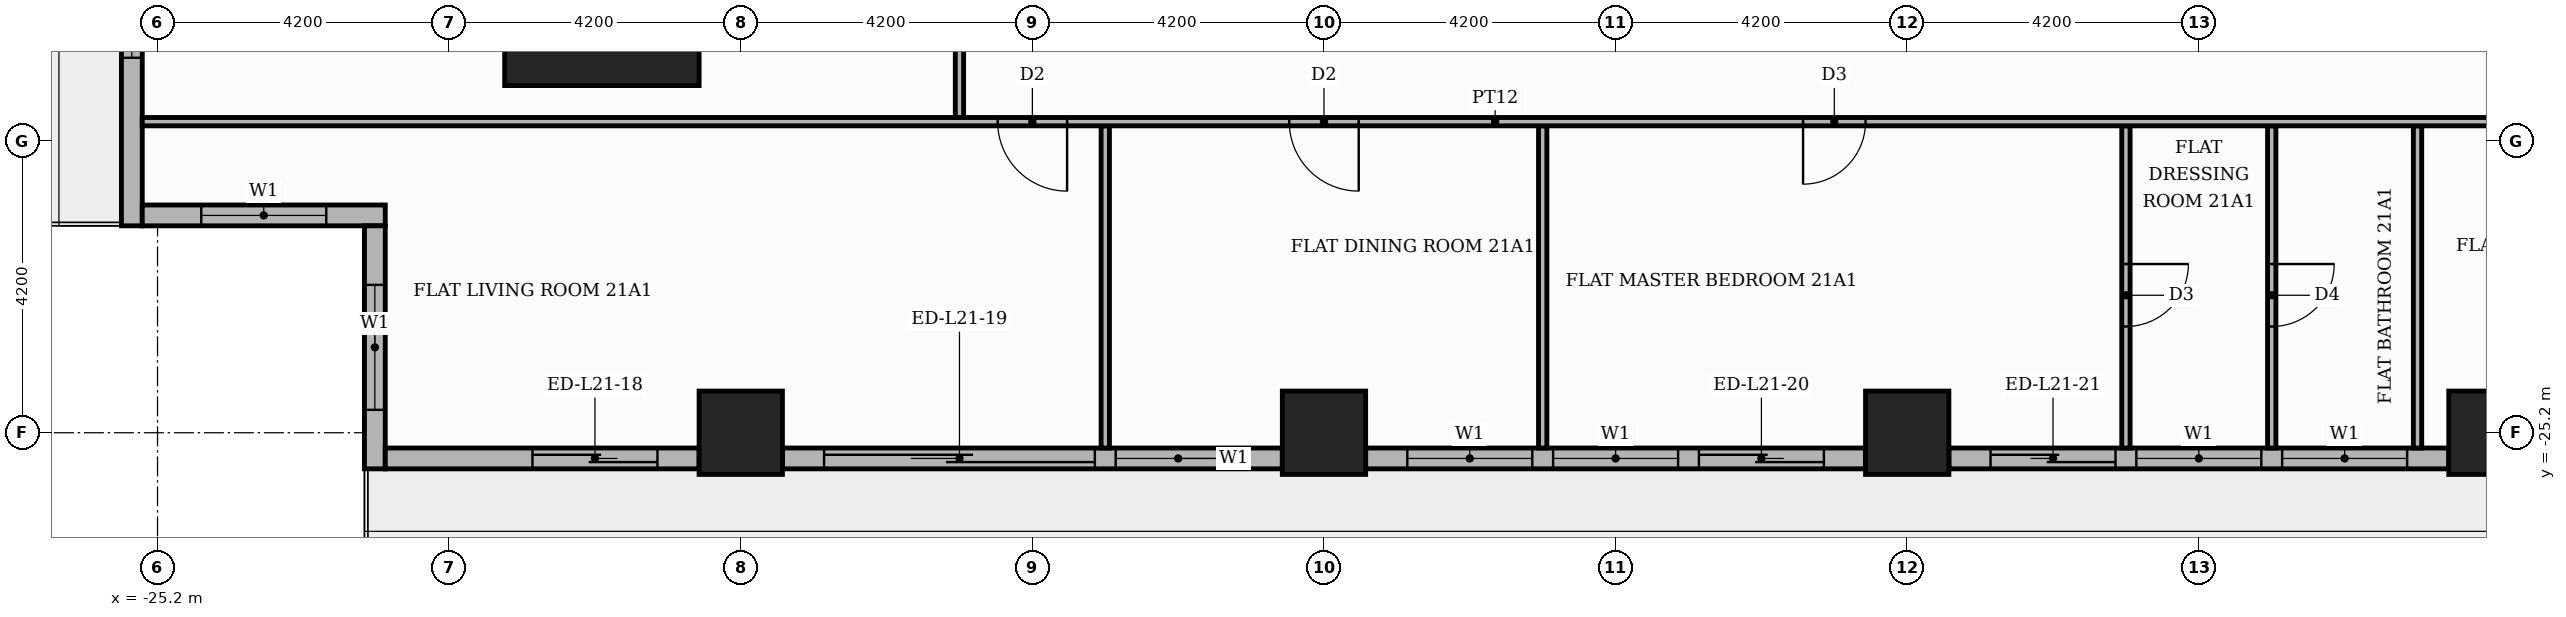
"""IFC4 building model, lengths in metres.
Left out: names, types, materials, properties, quantities, classifications, styles, units other than length and angle.
Written with IfcOpenShell. Run it as: python <this file> out.ifc"""

import sys

from ifc_helpers import new_model, si_unit, direction, frame, frame_2d, origin, origin_2d, place, context, subcontext, project, spatial, rectangle, extrude, element, fill, save


model = new_model("IFC4")
c1 = context("Model", 3, precision=1e-05, world=origin(), true_north=direction((0.0, 1.0)))
c2 = subcontext(c1, "Body", "Model", "MODEL_VIEW")
j1 = project(units=[si_unit("LENGTHUNIT", "METRE"), si_unit("PLANEANGLEUNIT", "RADIAN")], contexts=[c1])
p1 = place(None, origin())
s1 = spatial("IfcSite", under=j1, at=p1, CompositionType="ELEMENT")
p2 = place(p1, origin())
s2 = spatial("IfcBuilding", under=s1, at=p2, CompositionType="ELEMENT")
p3 = place(p2, frame((0.0, 0.0, 90.9)))
s3 = spatial("IfcBuildingStorey", under=s2, at=p3, CompositionType="ELEMENT", Elevation=90.9)
p4 = place(p3, frame((-18.8, -18.8, 0.0), z_axis=(0.0, 0.0, 1.0), x_axis=(1.0, 0.0, 0.0)))
e1 = element("IfcColumn", 1, at=p4, inside=s3, PredefinedType="COLUMN", context=c2, shape_type="SweptSolid", body=[
    extrude(rectangle(XDim=2.8, YDim=2.8, at=origin_2d()), origin(), (0.0, 0.0, 1.0), 3.9),
])
for number, where, z_axis, x_axis in (
    (2, (0.0, -25.2, 0.0), (0.0, 0.0, 1.0), (1.0, 0.0, 0.0)),
    (3, (8.4, -25.2, 0.0), (0.0, 0.0, 1.0), (1.0, 0.0, 0.0)),
    (4, (-8.4, -25.2, 0.0), (0.0, 0.0, 1.0), (1.0, 0.0, 0.0)),
    (5, (-16.8, -25.2, 0.0), (0.0, 0.0, 1.0), (1.0, 0.0, 0.0)),
):
    element("IfcColumn", number, at=place(p3, frame(where, z_axis=z_axis, x_axis=x_axis)), inside=s3, PredefinedType="COLUMN", context=c2, shape_type="SweptSolid", body=[
        extrude(rectangle(XDim=1.2, YDim=1.2, at=origin_2d()), origin(), (0.0, 0.0, 1.0), 3.9),
    ])
p5 = place(p3, frame((-25.57, -17.4, 0.0), z_axis=(0.0, 0.0, 1.0), x_axis=(0.0, -1.0, 0.0)))
e6 = element("IfcWall", 6, at=p5, inside=s3, PredefinedType="STANDARD", context=c2, shape_type="SweptSolid", body=[
    extrude(rectangle(XDim=4.82, YDim=0.3, at=frame_2d((2.41, 0.0))), origin(), (0.0, 0.0, 1.0), 3.48),
])
p6 = place(p5, frame((0.6, 0.0, 0.9)))
e7 = element("IfcOpeningElement", 7, at=p6, cuts=e6, PredefinedType="OPENING", context=c2, shape_type="SweptSolid", body=[
    extrude(rectangle(XDim=1.8, YDim=2.1, at=frame_2d((0.9, 1.05))), frame((0.0, 0.16, 0.0), z_axis=(0.0, -1.0, 0.0), x_axis=(1.0, 0.0, 0.0)), (0.0, 0.0, 1.0), 0.32),
])
p7 = place(p3, frame((-25.42, -22.07, 0.0), z_axis=(0.0, 0.0, 1.0), x_axis=(1.0, 0.0, 0.0)))
e8 = element("IfcWall", 8, at=p7, inside=s3, PredefinedType="STANDARD", context=c2, shape_type="SweptSolid", body=[
    extrude(rectangle(XDim=3.5, YDim=0.3, at=frame_2d((1.75, 0.0))), origin(), (0.0, 0.0, 1.0), 3.48),
])
p8 = place(p7, frame((0.85, 0.0, 0.9)))
e9 = element("IfcOpeningElement", 9, at=p8, cuts=e8, PredefinedType="OPENING", context=c2, shape_type="SweptSolid", body=[
    extrude(rectangle(XDim=1.8, YDim=2.1, at=frame_2d((0.9, 1.05))), frame((0.0, 0.16, 0.0), z_axis=(0.0, -1.0, 0.0), x_axis=(1.0, 0.0, 0.0)), (0.0, 0.0, 1.0), 0.32),
])
p9 = place(p3, frame((-22.07, -22.22, 0.0), z_axis=(0.0, 0.0, 1.0), x_axis=(0.0, -1.0, 0.0)))
e10 = element("IfcWall", 10, at=p9, inside=s3, PredefinedType="STANDARD", context=c2, shape_type="SweptSolid", body=[
    extrude(rectangle(XDim=3.5, YDim=0.3, at=frame_2d((1.75, 0.0))), origin(), (0.0, 0.0, 1.0), 3.48),
])
p10 = place(p9, frame((0.85, 0.0, 0.9)))
e11 = element("IfcOpeningElement", 11, at=p10, cuts=e10, PredefinedType="OPENING", context=c2, shape_type="SweptSolid", body=[
    extrude(rectangle(XDim=1.8, YDim=2.1, at=frame_2d((0.9, 1.05))), frame((0.0, 0.16, 0.0), z_axis=(0.0, -1.0, 0.0), x_axis=(1.0, 0.0, 0.0)), (0.0, 0.0, 1.0), 0.32),
])
p11 = place(p3, frame((-21.92, -25.57, 0.0), z_axis=(0.0, 0.0, 1.0), x_axis=(1.0, 0.0, 0.0)))
e12 = element("IfcWall", 12, at=p11, inside=s3, PredefinedType="STANDARD", context=c2, shape_type="SweptSolid", body=[
    extrude(rectangle(XDim=4.52, YDim=0.3, at=frame_2d((2.26, 0.0))), origin(), (0.0, 0.0, 1.0), 3.48),
])
p12 = place(p11, frame((2.12, 0.0, 0.0)))
e13 = element("IfcOpeningElement", 13, at=p12, cuts=e12, PredefinedType="OPENING", context=c2, shape_type="SweptSolid", body=[
    extrude(rectangle(XDim=1.8, YDim=2.4, at=frame_2d((0.9, 1.2))), frame((0.0, 0.16, 0.0), z_axis=(0.0, -1.0, 0.0), x_axis=(1.0, 0.0, 0.0)), (0.0, 0.0, 1.0), 0.32),
])
p13 = place(p3, frame((-16.2, -25.57, 0.0), z_axis=(0.0, 0.0, 1.0), x_axis=(1.0, 0.0, 0.0)))
e14 = element("IfcWall", 14, at=p13, inside=s3, PredefinedType="STANDARD", context=c2, shape_type="SweptSolid", body=[
    extrude(rectangle(XDim=7.2, YDim=0.3, at=frame_2d((3.6, 0.0))), origin(), (0.0, 0.0, 1.0), 3.48),
])
p14 = place(p13, frame((0.6, 0.0, 0.0)))
e15 = element("IfcOpeningElement", 15, at=p14, cuts=e14, PredefinedType="OPENING", context=c2, shape_type="SweptSolid", body=[
    extrude(rectangle(XDim=3.9, YDim=2.4, at=frame_2d((1.95, 1.2))), frame((0.0, 0.16, 0.0), z_axis=(0.0, -1.0, 0.0), x_axis=(1.0, 0.0, 0.0)), (0.0, 0.0, 1.0), 0.32),
])
p15 = place(p13, frame((4.8, 0.0, 0.9)))
e16 = element("IfcOpeningElement", 16, at=p15, cuts=e14, PredefinedType="OPENING", context=c2, shape_type="SweptSolid", body=[
    extrude(rectangle(XDim=1.8, YDim=2.1, at=frame_2d((0.9, 1.05))), frame((0.0, 0.16, 0.0), z_axis=(0.0, -1.0, 0.0), x_axis=(1.0, 0.0, 0.0)), (0.0, 0.0, 1.0), 0.32),
])
p16 = place(p3, frame((-7.8, -25.57, 0.0), z_axis=(0.0, 0.0, 1.0), x_axis=(1.0, 0.0, 0.0)))
e17 = element("IfcWall", 17, at=p16, inside=s3, PredefinedType="STANDARD", context=c2, shape_type="SweptSolid", body=[
    extrude(rectangle(XDim=7.2, YDim=0.3, at=frame_2d((3.6, 0.0))), origin(), (0.0, 0.0, 1.0), 3.48),
])
p17 = place(p16, frame((0.6, 0.0, 0.9)))
e18 = element("IfcOpeningElement", 18, at=p17, cuts=e17, PredefinedType="OPENING", context=c2, shape_type="SweptSolid", body=[
    extrude(rectangle(XDim=1.8, YDim=2.1, at=frame_2d((0.9, 1.05))), frame((0.0, 0.16, 0.0), z_axis=(0.0, -1.0, 0.0), x_axis=(1.0, 0.0, 0.0)), (0.0, 0.0, 1.0), 0.32),
])
p18 = place(p16, frame((2.7, 0.0, 0.9)))
e19 = element("IfcOpeningElement", 19, at=p18, cuts=e17, PredefinedType="OPENING", context=c2, shape_type="SweptSolid", body=[
    extrude(rectangle(XDim=1.8, YDim=2.1, at=frame_2d((0.9, 1.05))), frame((0.0, 0.16, 0.0), z_axis=(0.0, -1.0, 0.0), x_axis=(1.0, 0.0, 0.0)), (0.0, 0.0, 1.0), 0.32),
])
p19 = place(p16, frame((4.8, 0.0, 0.0)))
e20 = element("IfcOpeningElement", 20, at=p19, cuts=e17, PredefinedType="OPENING", context=c2, shape_type="SweptSolid", body=[
    extrude(rectangle(XDim=1.8, YDim=2.4, at=frame_2d((0.9, 1.2))), frame((0.0, 0.16, 0.0), z_axis=(0.0, -1.0, 0.0), x_axis=(1.0, 0.0, 0.0)), (0.0, 0.0, 1.0), 0.32),
])
p20 = place(p3, frame((0.6, -25.57, 0.0), z_axis=(0.0, 0.0, 1.0), x_axis=(1.0, 0.0, 0.0)))
e21 = element("IfcWall", 21, at=p20, inside=s3, PredefinedType="STANDARD", context=c2, shape_type="SweptSolid", body=[
    extrude(rectangle(XDim=7.2, YDim=0.3, at=frame_2d((3.6, 0.0))), origin(), (0.0, 0.0, 1.0), 3.48),
])
p21 = place(p20, frame((0.6, 0.0, 0.0)))
e22 = element("IfcOpeningElement", 22, at=p21, cuts=e21, PredefinedType="OPENING", context=c2, shape_type="SweptSolid", body=[
    extrude(rectangle(XDim=1.8, YDim=2.4, at=frame_2d((0.9, 1.2))), frame((0.0, 0.16, 0.0), z_axis=(0.0, -1.0, 0.0), x_axis=(1.0, 0.0, 0.0)), (0.0, 0.0, 1.0), 0.32),
])
p22 = place(p20, frame((2.7, 0.0, 0.9)))
e23 = element("IfcOpeningElement", 23, at=p22, cuts=e21, PredefinedType="OPENING", context=c2, shape_type="SweptSolid", body=[
    extrude(rectangle(XDim=1.8, YDim=2.1, at=frame_2d((0.9, 1.05))), frame((0.0, 0.16, 0.0), z_axis=(0.0, -1.0, 0.0), x_axis=(1.0, 0.0, 0.0)), (0.0, 0.0, 1.0), 0.32),
])
p23 = place(p20, frame((4.8, 0.0, 0.9)))
e24 = element("IfcOpeningElement", 24, at=p23, cuts=e21, PredefinedType="OPENING", context=c2, shape_type="SweptSolid", body=[
    extrude(rectangle(XDim=1.8, YDim=2.1, at=frame_2d((0.9, 1.05))), frame((0.0, 0.16, 0.0), z_axis=(0.0, -1.0, 0.0), x_axis=(1.0, 0.0, 0.0)), (0.0, 0.0, 1.0), 0.32),
])
for number, where, z_axis, x_axis in (
    (25, (-11.55, -25.42, 0.0), (0.0, 0.0, 1.0), (0.0, 1.0, 0.0)),
    (26, (-5.25, -25.42, 0.0), (0.0, 0.0, 1.0), (0.0, 1.0, 0.0)),
):
    element("IfcWall", number, at=place(p3, frame(where, z_axis=z_axis, x_axis=x_axis)), inside=s3, PredefinedType="PARTITIONING", context=c2, shape_type="SweptSolid", body=[
        extrude(rectangle(XDim=4.64, YDim=0.12, at=frame_2d((2.32, 0.0))), origin(), (0.0, 0.0, 1.0), 3.48),
    ])
p24 = place(p3, frame((3.15, -25.42, 0.0), z_axis=(0.0, 0.0, 1.0), x_axis=(0.0, 1.0, 0.0)))
e27 = element("IfcWall", 27, at=p24, inside=s3, PredefinedType="PARTITIONING", context=c2, shape_type="SweptSolid", body=[
    extrude(rectangle(XDim=4.64, YDim=0.12, at=frame_2d((2.32, 0.0))), origin(), (0.0, 0.0, 1.0), 3.48),
])
p25 = place(p24, frame((1.75, 0.0, 0.0)))
e28 = element("IfcOpeningElement", 28, at=p25, cuts=e27, PredefinedType="OPENING", context=c2, shape_type="SweptSolid", body=[
    extrude(rectangle(XDim=0.9, YDim=2.1, at=frame_2d((0.45, 1.05))), frame((0.0, 0.07, 0.0), z_axis=(0.0, -1.0, 0.0), x_axis=(1.0, 0.0, 0.0)), (0.0, 0.0, 1.0), 0.14),
])
p26 = place(p3, frame((5.25, -25.42, 0.0), z_axis=(0.0, 0.0, 1.0), x_axis=(0.0, 1.0, 0.0)))
e29 = element("IfcWall", 29, at=p26, inside=s3, PredefinedType="PARTITIONING", context=c2, shape_type="SweptSolid", body=[
    extrude(rectangle(XDim=4.64, YDim=0.12, at=frame_2d((2.32, 0.0))), origin(), (0.0, 0.0, 1.0), 3.48),
])
p27 = place(p26, frame((1.75, 0.0, 0.0)))
e30 = element("IfcOpeningElement", 30, at=p27, cuts=e29, PredefinedType="OPENING", context=c2, shape_type="SweptSolid", body=[
    extrude(rectangle(XDim=0.9, YDim=2.1, at=frame_2d((0.45, 1.05))), frame((0.0, 0.07, 0.0), z_axis=(0.0, -1.0, 0.0), x_axis=(1.0, 0.0, 0.0)), (0.0, 0.0, 1.0), 0.14),
])
p28 = place(p3, frame((7.35, -25.42, 0.0), z_axis=(0.0, 0.0, 1.0), x_axis=(0.0, 1.0, 0.0)))
e31 = element("IfcWall", 31, at=p28, inside=s3, PredefinedType="PARTITIONING", context=c2, shape_type="SweptSolid", body=[
    extrude(rectangle(XDim=4.64, YDim=0.12, at=frame_2d((2.32, 0.0))), origin(), (0.0, 0.0, 1.0), 3.48),
])
p29 = place(p3, frame((-25.42, -20.72, 0.0), z_axis=(0.0, 0.0, 1.0), x_axis=(1.0, 0.0, 0.0)))
e32 = element("IfcWall", 32, at=p29, inside=s3, PredefinedType="PARTITIONING", context=c2, shape_type="SweptSolid", body=[
    extrude(rectangle(XDim=38.97, YDim=0.12, at=frame_2d((19.485, 0.0))), origin(), (0.0, 0.0, 1.0), 3.48),
])
p30 = place(p29, frame((12.32, 0.0, 0.0)))
e33 = element("IfcOpeningElement", 33, at=p30, cuts=e32, PredefinedType="OPENING", context=c2, shape_type="SweptSolid", body=[
    extrude(rectangle(XDim=1.0, YDim=2.1, at=frame_2d((0.5, 1.05))), frame((0.0, 0.07, 0.0), z_axis=(0.0, -1.0, 0.0), x_axis=(1.0, 0.0, 0.0)), (0.0, 0.0, 1.0), 0.14),
])
p31 = place(p29, frame((16.52, 0.0, 0.0)))
e34 = element("IfcOpeningElement", 34, at=p31, cuts=e32, PredefinedType="OPENING", context=c2, shape_type="SweptSolid", body=[
    extrude(rectangle(XDim=1.0, YDim=2.1, at=frame_2d((0.5, 1.05))), frame((0.0, 0.07, 0.0), z_axis=(0.0, -1.0, 0.0), x_axis=(1.0, 0.0, 0.0)), (0.0, 0.0, 1.0), 0.14),
])
p32 = place(p29, frame((23.92, 0.0, 0.0)))
e35 = element("IfcOpeningElement", 35, at=p32, cuts=e32, PredefinedType="OPENING", context=c2, shape_type="SweptSolid", body=[
    extrude(rectangle(XDim=0.9, YDim=2.1, at=frame_2d((0.45, 1.05))), frame((0.0, 0.07, 0.0), z_axis=(0.0, -1.0, 0.0), x_axis=(1.0, 0.0, 0.0)), (0.0, 0.0, 1.0), 0.14),
])
p33 = place(p29, frame((34.42, 0.0, 0.0)))
e36 = element("IfcOpeningElement", 36, at=p33, cuts=e32, PredefinedType="OPENING", context=c2, shape_type="SweptSolid", body=[
    extrude(rectangle(XDim=0.9, YDim=2.1, at=frame_2d((0.45, 1.05))), frame((0.0, 0.07, 0.0), z_axis=(0.0, -1.0, 0.0), x_axis=(1.0, 0.0, 0.0)), (0.0, 0.0, 1.0), 0.14),
])
p34 = place(p3, frame((-13.65, -20.66, 0.0), z_axis=(0.0, 0.0, 1.0), x_axis=(0.0, 1.0, 0.0)))
e37 = element("IfcWall", 37, at=p34, inside=s3, PredefinedType="PARTITIONING", context=c2, shape_type="SweptSolid", body=[
    extrude(rectangle(XDim=6.91, YDim=0.12, at=frame_2d((3.455, 0.0))), origin(), (0.0, 0.0, 1.0), 3.48),
])
p35 = place(p34, frame((3.025, 0.0, 0.0)))
e38 = element("IfcOpeningElement", 38, at=p35, cuts=e37, PredefinedType="OPENING", context=c2, shape_type="SweptSolid", body=[
    extrude(rectangle(XDim=0.9, YDim=2.1, at=frame_2d((0.45, 1.05))), frame((0.0, 0.07, 0.0), z_axis=(0.0, -1.0, 0.0), x_axis=(1.0, 0.0, 0.0)), (0.0, 0.0, 1.0), 0.14),
])
p36 = place(p6, origin())
e39 = element("IfcWindow", 39, at=p36, inside=s3, PartitioningType="SINGLE_PANEL", PredefinedType="WINDOW", context=c2, shape_type="SweptSolid", body=[
    extrude(rectangle(XDim=1.8, YDim=2.1, at=frame_2d((0.9, 1.05))), frame((0.0, 0.03, 0.0), z_axis=(0.0, -1.0, 0.0), x_axis=(1.0, 0.0, 0.0)), (0.0, 0.0, 1.0), 0.06),
])
fill(e7, e39)
p37 = place(p8, origin())
e40 = element("IfcWindow", 40, at=p37, inside=s3, PartitioningType="SINGLE_PANEL", PredefinedType="WINDOW", context=c2, shape_type="SweptSolid", body=[
    extrude(rectangle(XDim=1.8, YDim=2.1, at=frame_2d((0.9, 1.05))), frame((0.0, 0.03, 0.0), z_axis=(0.0, -1.0, 0.0), x_axis=(1.0, 0.0, 0.0)), (0.0, 0.0, 1.0), 0.06),
])
fill(e9, e40)
p38 = place(p10, origin())
e41 = element("IfcWindow", 41, at=p38, inside=s3, PartitioningType="SINGLE_PANEL", PredefinedType="WINDOW", context=c2, shape_type="SweptSolid", body=[
    extrude(rectangle(XDim=1.8, YDim=2.1, at=frame_2d((0.9, 1.05))), frame((0.0, 0.03, 0.0), z_axis=(0.0, -1.0, 0.0), x_axis=(1.0, 0.0, 0.0)), (0.0, 0.0, 1.0), 0.06),
])
fill(e11, e41)
p39 = place(p12, origin())
e42 = element("IfcDoor", 42, at=p39, inside=s3, OperationType="SLIDING_TO_RIGHT", PredefinedType="DOOR", context=c2, shape_type="SweptSolid", body=[
    extrude(rectangle(XDim=1.8, YDim=2.4, at=frame_2d((0.9, 1.2))), frame((0.0, 0.025, 0.0), z_axis=(0.0, -1.0, 0.0), x_axis=(1.0, 0.0, 0.0)), (0.0, 0.0, 1.0), 0.05),
])
fill(e13, e42)
p40 = place(p14, origin())
e43 = element("IfcDoor", 43, at=p40, inside=s3, OperationType="SLIDING_TO_LEFT", PredefinedType="DOOR", context=c2, shape_type="SweptSolid", body=[
    extrude(rectangle(XDim=3.9, YDim=2.4, at=frame_2d((1.95, 1.2))), frame((0.0, 0.025, 0.0), z_axis=(0.0, -1.0, 0.0), x_axis=(1.0, 0.0, 0.0)), (0.0, 0.0, 1.0), 0.05),
])
fill(e15, e43)
p41 = place(p15, origin())
e44 = element("IfcWindow", 44, at=p41, inside=s3, PartitioningType="SINGLE_PANEL", PredefinedType="WINDOW", context=c2, shape_type="SweptSolid", body=[
    extrude(rectangle(XDim=1.8, YDim=2.1, at=frame_2d((0.9, 1.05))), frame((0.0, 0.03, 0.0), z_axis=(0.0, -1.0, 0.0), x_axis=(1.0, 0.0, 0.0)), (0.0, 0.0, 1.0), 0.06),
])
fill(e16, e44)
p42 = place(p17, origin())
e45 = element("IfcWindow", 45, at=p42, inside=s3, PartitioningType="SINGLE_PANEL", PredefinedType="WINDOW", context=c2, shape_type="SweptSolid", body=[
    extrude(rectangle(XDim=1.8, YDim=2.1, at=frame_2d((0.9, 1.05))), frame((0.0, 0.03, 0.0), z_axis=(0.0, -1.0, 0.0), x_axis=(1.0, 0.0, 0.0)), (0.0, 0.0, 1.0), 0.06),
])
fill(e18, e45)
p43 = place(p18, origin())
e46 = element("IfcWindow", 46, at=p43, inside=s3, PartitioningType="SINGLE_PANEL", PredefinedType="WINDOW", context=c2, shape_type="SweptSolid", body=[
    extrude(rectangle(XDim=1.8, YDim=2.1, at=frame_2d((0.9, 1.05))), frame((0.0, 0.03, 0.0), z_axis=(0.0, -1.0, 0.0), x_axis=(1.0, 0.0, 0.0)), (0.0, 0.0, 1.0), 0.06),
])
fill(e19, e46)
p44 = place(p19, origin())
e47 = element("IfcDoor", 47, at=p44, inside=s3, OperationType="SLIDING_TO_RIGHT", PredefinedType="DOOR", context=c2, shape_type="SweptSolid", body=[
    extrude(rectangle(XDim=1.8, YDim=2.4, at=frame_2d((0.9, 1.2))), frame((0.0, 0.025, 0.0), z_axis=(0.0, -1.0, 0.0), x_axis=(1.0, 0.0, 0.0)), (0.0, 0.0, 1.0), 0.05),
])
fill(e20, e47)
p45 = place(p21, origin())
e48 = element("IfcDoor", 48, at=p45, inside=s3, OperationType="SLIDING_TO_LEFT", PredefinedType="DOOR", context=c2, shape_type="SweptSolid", body=[
    extrude(rectangle(XDim=1.8, YDim=2.4, at=frame_2d((0.9, 1.2))), frame((0.0, 0.025, 0.0), z_axis=(0.0, -1.0, 0.0), x_axis=(1.0, 0.0, 0.0)), (0.0, 0.0, 1.0), 0.05),
])
fill(e22, e48)
p46 = place(p22, origin())
e49 = element("IfcWindow", 49, at=p46, inside=s3, PartitioningType="SINGLE_PANEL", PredefinedType="WINDOW", context=c2, shape_type="SweptSolid", body=[
    extrude(rectangle(XDim=1.8, YDim=2.1, at=frame_2d((0.9, 1.05))), frame((0.0, 0.03, 0.0), z_axis=(0.0, -1.0, 0.0), x_axis=(1.0, 0.0, 0.0)), (0.0, 0.0, 1.0), 0.06),
])
fill(e23, e49)
p47 = place(p23, origin())
e50 = element("IfcWindow", 50, at=p47, inside=s3, PartitioningType="SINGLE_PANEL", PredefinedType="WINDOW", context=c2, shape_type="SweptSolid", body=[
    extrude(rectangle(XDim=1.8, YDim=2.1, at=frame_2d((0.9, 1.05))), frame((0.0, 0.03, 0.0), z_axis=(0.0, -1.0, 0.0), x_axis=(1.0, 0.0, 0.0)), (0.0, 0.0, 1.0), 0.06),
])
fill(e24, e50)
p48 = place(p30, frame((1.0, 0.0, 0.0), z_axis=(0.0, 0.0, 1.0), x_axis=(-1.0, 0.0, 0.0)))
e51 = element("IfcDoor", 51, at=p48, inside=s3, OperationType="SINGLE_SWING_RIGHT", PredefinedType="DOOR", context=c2, shape_type="SweptSolid", body=[
    extrude(rectangle(XDim=1.0, YDim=2.1, at=frame_2d((0.5, 1.05))), frame((0.0, 0.025, 0.0), z_axis=(0.0, -1.0, 0.0), x_axis=(1.0, 0.0, 0.0)), (0.0, 0.0, 1.0), 0.05),
])
fill(e33, e51)
p49 = place(p31, frame((1.0, 0.0, 0.0), z_axis=(0.0, 0.0, 1.0), x_axis=(-1.0, 0.0, 0.0)))
e52 = element("IfcDoor", 52, at=p49, inside=s3, OperationType="SINGLE_SWING_RIGHT", PredefinedType="DOOR", context=c2, shape_type="SweptSolid", body=[
    extrude(rectangle(XDim=1.0, YDim=2.1, at=frame_2d((0.5, 1.05))), frame((0.0, 0.025, 0.0), z_axis=(0.0, -1.0, 0.0), x_axis=(1.0, 0.0, 0.0)), (0.0, 0.0, 1.0), 0.05),
])
fill(e34, e52)
p50 = place(p32, frame((0.9, 0.0, 0.0), z_axis=(0.0, 0.0, 1.0), x_axis=(-1.0, 0.0, 0.0)))
e53 = element("IfcDoor", 53, at=p50, inside=s3, OperationType="SINGLE_SWING_LEFT", PredefinedType="DOOR", context=c2, shape_type="SweptSolid", body=[
    extrude(rectangle(XDim=0.9, YDim=2.1, at=frame_2d((0.45, 1.05))), frame((0.0, 0.025, 0.0), z_axis=(0.0, -1.0, 0.0), x_axis=(1.0, 0.0, 0.0)), (0.0, 0.0, 1.0), 0.05),
])
fill(e35, e53)
p51 = place(p25, frame((0.9, 0.0, 0.0), z_axis=(0.0, 0.0, 1.0), x_axis=(-1.0, 0.0, 0.0)))
e54 = element("IfcDoor", 54, at=p51, inside=s3, OperationType="SINGLE_SWING_RIGHT", PredefinedType="DOOR", context=c2, shape_type="SweptSolid", body=[
    extrude(rectangle(XDim=0.9, YDim=2.1, at=frame_2d((0.45, 1.05))), frame((0.0, 0.025, 0.0), z_axis=(0.0, -1.0, 0.0), x_axis=(1.0, 0.0, 0.0)), (0.0, 0.0, 1.0), 0.05),
])
fill(e28, e54)
p52 = place(p27, frame((0.9, 0.0, 0.0), z_axis=(0.0, 0.0, 1.0), x_axis=(-1.0, 0.0, 0.0)))
e55 = element("IfcDoor", 55, at=p52, inside=s3, OperationType="SINGLE_SWING_RIGHT", PredefinedType="DOOR", context=c2, shape_type="SweptSolid", body=[
    extrude(rectangle(XDim=0.9, YDim=2.1, at=frame_2d((0.45, 1.05))), frame((0.0, 0.025, 0.0), z_axis=(0.0, -1.0, 0.0), x_axis=(1.0, 0.0, 0.0)), (0.0, 0.0, 1.0), 0.05),
])
fill(e30, e55)
save(model, sys.argv[1])
